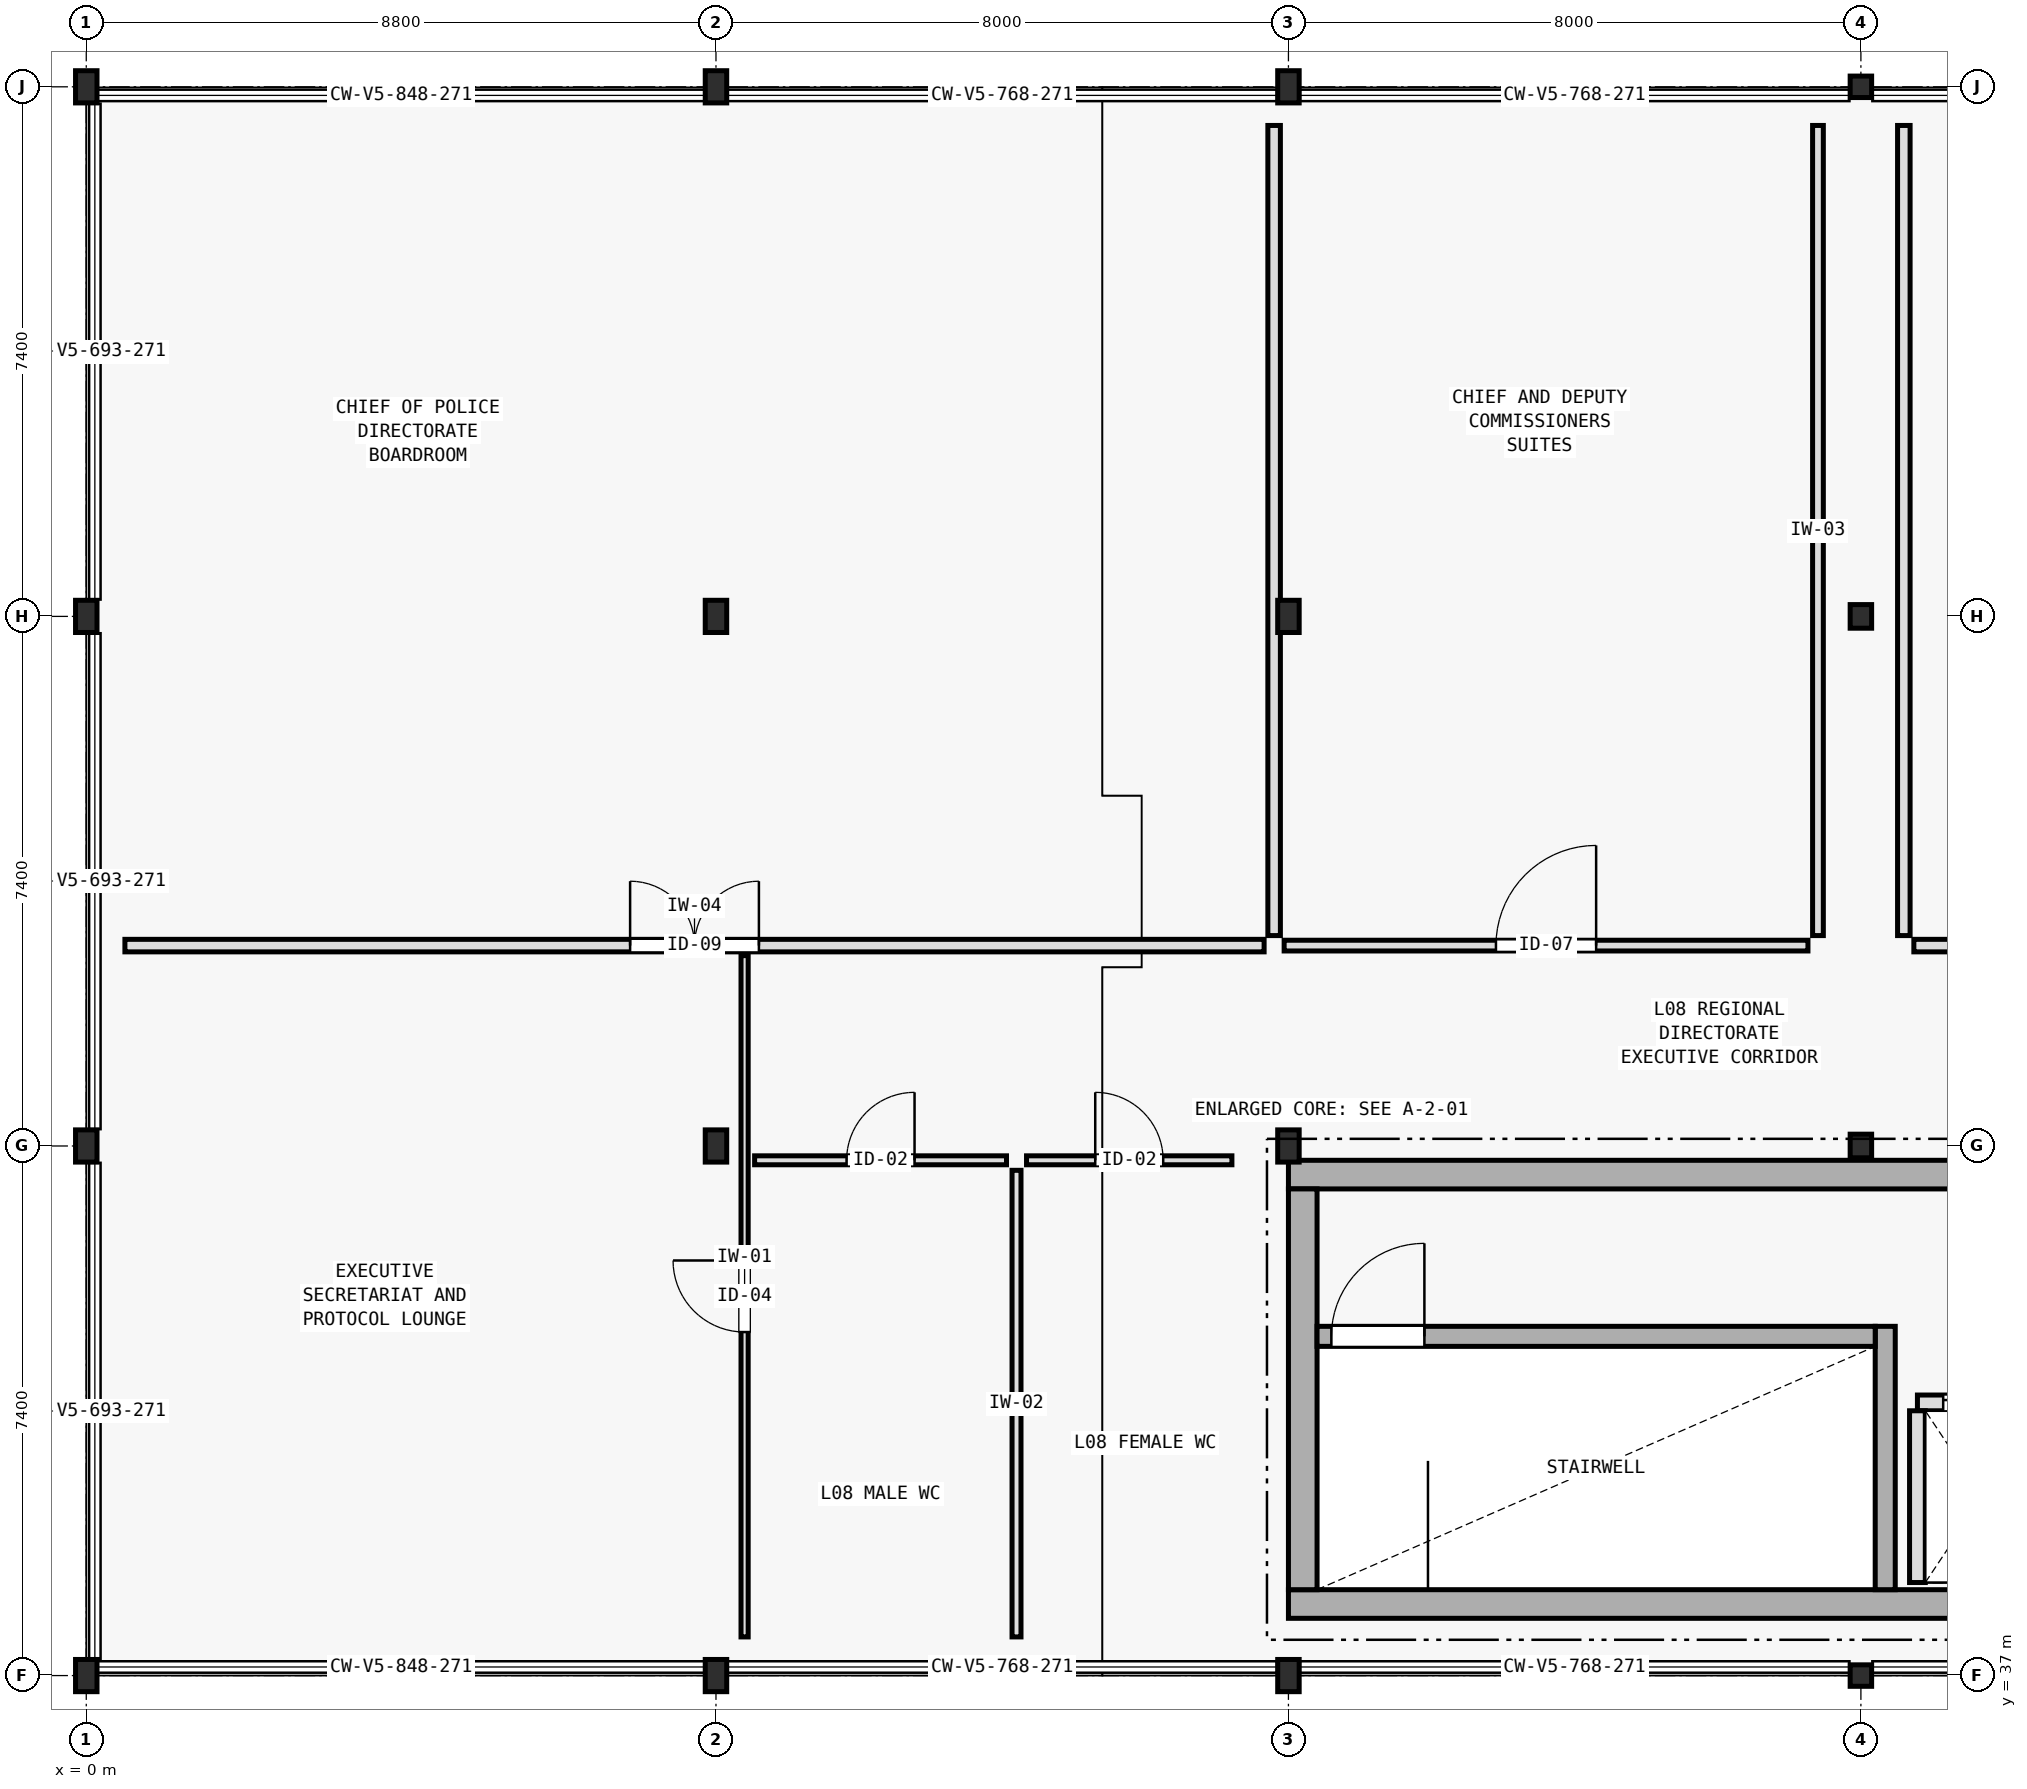
"""IFC4 building model, lengths in metres.
Left out: names, types, materials, properties, quantities, classifications, styles, units other than length and angle.
Written with IfcOpenShell. Run it as: python <this file> out.ifc"""

import sys

from ifc_helpers import new_model, si_unit, direction, frame, frame_2d, origin, origin_2d, place, context, subcontext, project, spatial, rectangle, i_section, extrude, element, fill, save


model = new_model("IFC4")
c1 = context("Model", 3, precision=1e-05, world=origin(), true_north=direction((0.0, 1.0)))
c2 = subcontext(c1, "Body", "Model", "MODEL_VIEW")
j1 = project(units=[si_unit("LENGTHUNIT", "METRE"), si_unit("PLANEANGLEUNIT", "RADIAN")], contexts=[c1])
p1 = place(None, origin())
s1 = spatial("IfcSite", under=j1, at=p1, CompositionType="ELEMENT")
p2 = place(p1, origin())
s2 = spatial("IfcBuilding", under=s1, at=p2, CompositionType="ELEMENT")
p3 = place(p2, frame((0.0, 0.0, 31.1)))
s3 = spatial("IfcBuildingStorey", under=s2, at=p3, CompositionType="ELEMENT", Elevation=31.1)
p4 = place(p3, frame((16.8, 38.0, 0.0), z_axis=(0.0, 0.0, 1.0), x_axis=(1.0, 0.0, 0.0)))
e1 = element("IfcWall", 1, at=p4, inside=s3, PredefinedType="SHEAR", context=c2, shape_type="SweptSolid", body=[
    extrude(rectangle(XDim=16.4, YDim=0.4, at=frame_2d((8.2, 0.0))), origin(), (0.0, 0.0, 1.0), 3.895),
])
p5 = place(p3, frame((16.8, 44.0, 0.0), z_axis=(0.0, 0.0, 1.0), x_axis=(1.0, 0.0, 0.0)))
e2 = element("IfcWall", 2, at=p5, inside=s3, PredefinedType="SHEAR", context=c2, shape_type="SweptSolid", body=[
    extrude(rectangle(XDim=16.4, YDim=0.4, at=frame_2d((8.2, 0.0))), origin(), (0.0, 0.0, 1.0), 3.895),
])
p6 = place(p5, frame((10.3, 0.0, 0.0)))
e3 = element("IfcOpeningElement", 3, at=p6, cuts=e2, PredefinedType="OPENING", context=c2, shape_type="SweptSolid", body=[
    extrude(rectangle(XDim=1.6, YDim=2.2, at=frame_2d((0.8, 1.1))), frame((0.0, 0.21, 0.0), z_axis=(0.0, -1.0, 0.0), x_axis=(1.0, 0.0, 0.0)), (0.0, 0.0, 1.0), 0.42),
])
p7 = place(p3, frame((17.0, 38.2, 0.0), z_axis=(0.0, 0.0, 1.0), x_axis=(0.0, 1.0, 0.0)))
e4 = element("IfcWall", 4, at=p7, inside=s3, PredefinedType="SHEAR", context=c2, shape_type="SweptSolid", body=[
    extrude(rectangle(XDim=5.6, YDim=0.4, at=frame_2d((2.8, 0.0))), origin(), (0.0, 0.0, 1.0), 3.895),
])
p8 = place(p3, frame((25.14, 38.2, 0.0), z_axis=(0.0, 0.0, 1.0), x_axis=(0.0, 1.0, 0.0)))
e5 = element("IfcWall", 5, at=p8, inside=s3, PredefinedType="SHEAR", context=c2, shape_type="SweptSolid", body=[
    extrude(rectangle(XDim=3.68, YDim=0.28, at=frame_2d((1.84, 0.0))), origin(), (0.0, 0.0, 1.0), 3.895),
])
p9 = place(p3, frame((17.2, 41.74, 0.0), z_axis=(0.0, 0.0, 1.0), x_axis=(1.0, 0.0, 0.0)))
e6 = element("IfcWall", 6, at=p9, inside=s3, PredefinedType="SHEAR", context=c2, shape_type="SweptSolid", body=[
    extrude(rectangle(XDim=7.8, YDim=0.28, at=frame_2d((3.9, 0.0))), origin(), (0.0, 0.0, 1.0), 3.895),
])
p10 = place(p9, frame((0.2, 0.0, 0.0)))
e7 = element("IfcOpeningElement", 7, at=p10, cuts=e6, PredefinedType="OPENING", context=c2, shape_type="SweptSolid", body=[
    extrude(rectangle(XDim=1.3, YDim=2.2, at=frame_2d((0.65, 1.1))), frame((0.0, 0.15, 0.0), z_axis=(0.0, -1.0, 0.0), x_axis=(1.0, 0.0, 0.0)), (0.0, 0.0, 1.0), 0.3),
])
for number, where, z_axis, x_axis in (
    (8, (0.0, 37.0, 0.0), (0.0, 0.0, 1.0), (1.0, 0.0, 0.0)),
    (9, (0.0, 44.4, 0.0), (0.0, 0.0, 1.0), (1.0, 0.0, 0.0)),
    (10, (0.0, 51.8, 0.0), (0.0, 0.0, 1.0), (1.0, 0.0, 0.0)),
    (11, (0.0, 59.2, 0.0), (0.0, 0.0, 1.0), (1.0, 0.0, 0.0)),
    (12, (8.8, 37.0, 0.0), (0.0, 0.0, 1.0), (1.0, 0.0, 0.0)),
    (13, (8.8, 44.4, 0.0), (0.0, 0.0, 1.0), (1.0, 0.0, 0.0)),
    (14, (8.8, 51.8, 0.0), (0.0, 0.0, 1.0), (1.0, 0.0, 0.0)),
    (15, (8.8, 59.2, 0.0), (0.0, 0.0, 1.0), (1.0, 0.0, 0.0)),
    (16, (16.8, 37.0, 0.0), (0.0, 0.0, 1.0), (1.0, 0.0, 0.0)),
    (17, (16.8, 44.4, 0.0), (0.0, 0.0, 1.0), (1.0, 0.0, 0.0)),
    (18, (16.8, 51.8, 0.0), (0.0, 0.0, 1.0), (1.0, 0.0, 0.0)),
    (19, (16.8, 59.2, 0.0), (0.0, 0.0, 1.0), (1.0, 0.0, 0.0)),
):
    element("IfcColumn", number, at=place(p3, frame(where, z_axis=z_axis, x_axis=x_axis)), inside=s3, PredefinedType="COLUMN", context=c2, shape_type="SweptSolid", body=[
        extrude(i_section(OverallWidth=0.3, OverallDepth=0.45, WebThickness=0.014, FlangeThickness=0.026, FilletRadius=0.027, at=origin_2d()), origin(), (0.0, 0.0, 1.0), 3.9),
    ])
p11 = place(p3, frame((24.8, 37.0, 0.0), z_axis=(0.0, 0.0, 1.0), x_axis=(1.0, 0.0, 0.0)))
e20 = element("IfcColumn", 20, at=p11, inside=s3, PredefinedType="COLUMN", context=c2, shape_type="SweptSolid", body=[
    extrude(i_section(OverallWidth=0.3, OverallDepth=0.3, WebThickness=0.011, FlangeThickness=0.019, FilletRadius=0.027, at=origin_2d()), origin(), (0.0, 0.0, 1.0), 3.9),
])
for number, where, z_axis, x_axis in (
    (21, (24.8, 44.4, 0.0), (0.0, 0.0, 1.0), (1.0, 0.0, 0.0)),
    (22, (24.8, 51.8, 0.0), (0.0, 0.0, 1.0), (1.0, 0.0, 0.0)),
):
    element("IfcColumn", number, at=place(p3, frame(where, z_axis=z_axis, x_axis=x_axis)), inside=s3, PredefinedType="COLUMN", context=c2, shape_type="SweptSolid", body=[
        extrude(i_section(OverallWidth=0.3, OverallDepth=0.33, WebThickness=0.01, FlangeThickness=0.017, FilletRadius=0.027, at=origin_2d()), origin(), (0.0, 0.0, 1.0), 3.9),
    ])
p12 = place(p3, frame((24.8, 59.2, 0.0), z_axis=(0.0, 0.0, 1.0), x_axis=(1.0, 0.0, 0.0)))
e23 = element("IfcColumn", 23, at=p12, inside=s3, PredefinedType="COLUMN", context=c2, shape_type="SweptSolid", body=[
    extrude(i_section(OverallWidth=0.3, OverallDepth=0.3, WebThickness=0.011, FlangeThickness=0.019, FilletRadius=0.027, at=origin_2d()), origin(), (0.0, 0.0, 1.0), 3.9),
])
p13 = place(p3, frame((25.59, 40.81, 0.0), z_axis=(0.0, 0.0, 1.0), x_axis=(1.0, 0.0, 0.0)))
e24 = element("IfcWall", 24, at=p13, inside=s3, PredefinedType="PLUMBINGWALL", context=c2, shape_type="SweptSolid", body=[
    extrude(rectangle(XDim=1.82, YDim=0.22, at=frame_2d((0.91, 0.0))), origin(), (0.0, 0.0, 1.0), 3.62),
])
p14 = place(p13, frame((0.36, 0.0, 0.0)))
e25 = element("IfcOpeningElement", 25, at=p14, cuts=e24, PredefinedType="OPENING", context=c2, shape_type="SweptSolid", body=[
    extrude(rectangle(XDim=1.1, YDim=2.2, at=frame_2d((0.55, 1.1))), frame((0.0, 0.12, 0.0), z_axis=(0.0, -1.0, 0.0), x_axis=(1.0, 0.0, 0.0)), (0.0, 0.0, 1.0), 0.24),
])
p15 = place(p3, frame((25.59, 38.3, 0.0), z_axis=(0.0, 0.0, 1.0), x_axis=(0.0, 1.0, 0.0)))
e26 = element("IfcWall", 26, at=p15, inside=s3, PredefinedType="PLUMBINGWALL", context=c2, shape_type="SweptSolid", body=[
    extrude(rectangle(XDim=2.4, YDim=0.22, at=frame_2d((1.2, 0.0))), origin(), (0.0, 0.0, 1.0), 3.62),
])
p16 = place(p3, frame((0.54, 47.2, 0.0), z_axis=(0.0, 0.0, 1.0), x_axis=(1.0, 0.0, 0.0)))
e27 = element("IfcWall", 27, at=p16, inside=s3, PredefinedType="PARTITIONING", context=c2, shape_type="SweptSolid", body=[
    extrude(rectangle(XDim=15.92, YDim=0.175, at=frame_2d((7.96, 0.0))), origin(), (0.0, 0.0, 1.0), 3.2),
])
p17 = place(p16, frame((7.06, 0.0, 0.0)))
e28 = element("IfcOpeningElement", 28, at=p17, cuts=e27, PredefinedType="OPENING", context=c2, shape_type="SweptSolid", body=[
    extrude(rectangle(XDim=1.8, YDim=2.3, at=frame_2d((0.9, 1.15))), frame((0.0, 0.098, 0.0), z_axis=(0.0, -1.0, 0.0), x_axis=(1.0, 0.0, 0.0)), (0.0, 0.0, 1.0), 0.195),
])
p18 = place(p3, frame((16.6, 47.34, 0.0), z_axis=(0.0, 0.0, 1.0), x_axis=(0.0, 1.0, 0.0)))
e29 = element("IfcWall", 29, at=p18, inside=s3, PredefinedType="PARTITIONING", context=c2, shape_type="SweptSolid", body=[
    extrude(rectangle(XDim=11.32, YDim=0.175, at=frame_2d((5.66, 0.0))), origin(), (0.0, 0.0, 1.0), 2.7),
])
p19 = place(p3, frame((16.74, 47.2, 0.0), z_axis=(0.0, 0.0, 1.0), x_axis=(1.0, 0.0, 0.0)))
e30 = element("IfcWall", 30, at=p19, inside=s3, PredefinedType="PARTITIONING", context=c2, shape_type="SweptSolid", body=[
    extrude(rectangle(XDim=7.32, YDim=0.15, at=frame_2d((3.66, 0.0))), origin(), (0.0, 0.0, 1.0), 3.2),
])
p20 = place(p19, frame((2.96, 0.0, 0.0)))
e31 = element("IfcOpeningElement", 31, at=p20, cuts=e30, PredefinedType="OPENING", context=c2, shape_type="SweptSolid", body=[
    extrude(rectangle(XDim=1.4, YDim=2.2, at=frame_2d((0.7, 1.1))), frame((0.0, 0.085, 0.0), z_axis=(0.0, -1.0, 0.0), x_axis=(1.0, 0.0, 0.0)), (0.0, 0.0, 1.0), 0.17),
])
p21 = place(p3, frame((24.2, 47.34, 0.0), z_axis=(0.0, 0.0, 1.0), x_axis=(0.0, 1.0, 0.0)))
e32 = element("IfcWall", 32, at=p21, inside=s3, PredefinedType="PARTITIONING", context=c2, shape_type="SweptSolid", body=[
    extrude(rectangle(XDim=11.32, YDim=0.15, at=frame_2d((5.66, 0.0))), origin(), (0.0, 0.0, 1.0), 2.7),
])
p22 = place(p3, frame((25.54, 47.2, 0.0), z_axis=(0.0, 0.0, 1.0), x_axis=(1.0, 0.0, 0.0)))
e33 = element("IfcWall", 33, at=p22, inside=s3, PredefinedType="PARTITIONING", context=c2, shape_type="SweptSolid", body=[
    extrude(rectangle(XDim=12.32, YDim=0.175, at=frame_2d((6.16, 0.0))), origin(), (0.0, 0.0, 1.0), 3.2),
])
p23 = place(p22, frame((5.46, 0.0, 0.0)))
e34 = element("IfcOpeningElement", 34, at=p23, cuts=e33, PredefinedType="OPENING", context=c2, shape_type="SweptSolid", body=[
    extrude(rectangle(XDim=1.4, YDim=2.2, at=frame_2d((0.7, 1.1))), frame((0.0, 0.098, 0.0), z_axis=(0.0, -1.0, 0.0), x_axis=(1.0, 0.0, 0.0)), (0.0, 0.0, 1.0), 0.195),
])
p24 = place(p3, frame((25.4, 47.34, 0.0), z_axis=(0.0, 0.0, 1.0), x_axis=(0.0, 1.0, 0.0)))
e35 = element("IfcWall", 35, at=p24, inside=s3, PredefinedType="PARTITIONING", context=c2, shape_type="SweptSolid", body=[
    extrude(rectangle(XDim=11.32, YDim=0.175, at=frame_2d((5.66, 0.0))), origin(), (0.0, 0.0, 1.0), 3.2),
])
p25 = place(p3, frame((9.2, 37.54, 0.0), z_axis=(0.0, 0.0, 1.0), x_axis=(0.0, 1.0, 0.0)))
e36 = element("IfcWall", 36, at=p25, inside=s3, PredefinedType="PARTITIONING", context=c2, shape_type="SweptSolid", body=[
    extrude(rectangle(XDim=9.52, YDim=0.1, at=frame_2d((4.76, 0.0))), origin(), (0.0, 0.0, 1.0), 2.7),
])
p26 = place(p25, frame((4.26, 0.0, 0.0)))
e37 = element("IfcOpeningElement", 37, at=p26, cuts=e36, PredefinedType="OPENING", context=c2, shape_type="SweptSolid", body=[
    extrude(rectangle(XDim=1.0, YDim=2.2, at=frame_2d((0.5, 1.1))), frame((0.0, 0.06, 0.0), z_axis=(0.0, -1.0, 0.0), x_axis=(1.0, 0.0, 0.0)), (0.0, 0.0, 1.0), 0.12),
])
p27 = place(p3, frame((9.34, 44.2, 0.0), z_axis=(0.0, 0.0, 1.0), x_axis=(1.0, 0.0, 0.0)))
e38 = element("IfcWall", 38, at=p27, inside=s3, PredefinedType="PARTITIONING", context=c2, shape_type="SweptSolid", body=[
    extrude(rectangle(XDim=3.52, YDim=0.125, at=frame_2d((1.76, 0.0))), origin(), (0.0, 0.0, 1.0), 2.7),
])
p28 = place(p27, frame((1.285, 0.0, 0.0)))
e39 = element("IfcOpeningElement", 39, at=p28, cuts=e38, PredefinedType="OPENING", context=c2, shape_type="SweptSolid", body=[
    extrude(rectangle(XDim=0.95, YDim=2.1, at=frame_2d((0.475, 1.05))), frame((0.0, 0.073, 0.0), z_axis=(0.0, -1.0, 0.0), x_axis=(1.0, 0.0, 0.0)), (0.0, 0.0, 1.0), 0.145),
])
p29 = place(p3, frame((13.0, 37.54, 0.0), z_axis=(0.0, 0.0, 1.0), x_axis=(0.0, 1.0, 0.0)))
e40 = element("IfcWall", 40, at=p29, inside=s3, PredefinedType="PARTITIONING", context=c2, shape_type="SweptSolid", body=[
    extrude(rectangle(XDim=6.52, YDim=0.125, at=frame_2d((3.26, 0.0))), origin(), (0.0, 0.0, 1.0), 3.62),
])
p30 = place(p3, frame((13.14, 44.2, 0.0), z_axis=(0.0, 0.0, 1.0), x_axis=(1.0, 0.0, 0.0)))
e41 = element("IfcWall", 41, at=p30, inside=s3, PredefinedType="PARTITIONING", context=c2, shape_type="SweptSolid", body=[
    extrude(rectangle(XDim=2.87, YDim=0.125, at=frame_2d((1.435, 0.0))), origin(), (0.0, 0.0, 1.0), 2.7),
])
p31 = place(p30, frame((0.96, 0.0, 0.0)))
e42 = element("IfcOpeningElement", 42, at=p31, cuts=e41, PredefinedType="OPENING", context=c2, shape_type="SweptSolid", body=[
    extrude(rectangle(XDim=0.95, YDim=2.1, at=frame_2d((0.475, 1.05))), frame((0.0, 0.073, 0.0), z_axis=(0.0, -1.0, 0.0), x_axis=(1.0, 0.0, 0.0)), (0.0, 0.0, 1.0), 0.145),
])
p32 = place(p2, frame((0.0, 0.0, 35.0)))
p33 = place(p32, frame((0.0, 0.0, -0.28)))
p34 = place(p33, frame((21.0, 40.0, 0.23)))
e43 = element("IfcWindow", 43, at=p34, inside=s3, PartitioningType="SINGLE_PANEL", PredefinedType="SKYLIGHT", context=c2, shape_type="SweptSolid", body=[
    extrude(rectangle(XDim=1.1, YDim=1.4, at=origin_2d()), origin(), (0.0, 0.0, 1.0), 0.05),
])
p35 = place(p10, origin())
e44 = element("IfcDoor", 44, at=p35, inside=s3, OperationType="SINGLE_SWING_RIGHT", PredefinedType="DOOR", context=c2, shape_type="SweptSolid", body=[
    extrude(rectangle(XDim=1.3, YDim=2.2, at=frame_2d((0.65, 1.1))), frame((0.0, 0.025, 0.0), z_axis=(0.0, -1.0, 0.0), x_axis=(1.0, 0.0, 0.0)), (0.0, 0.0, 1.0), 0.05),
])
fill(e7, e44)
p36 = place(p14, origin())
e45 = element("IfcDoor", 45, at=p36, inside=s3, OperationType="DOUBLE_DOOR_SLIDING", PredefinedType="DOOR", context=c2, shape_type="SweptSolid", body=[
    extrude(rectangle(XDim=1.1, YDim=2.2, at=frame_2d((0.55, 1.1))), frame((0.0, 0.025, 0.0), z_axis=(0.0, -1.0, 0.0), x_axis=(1.0, 0.0, 0.0)), (0.0, 0.0, 1.0), 0.05),
])
fill(e25, e45)
p37 = place(p17, origin())
e46 = element("IfcDoor", 46, at=p37, inside=s3, OperationType="DOUBLE_DOOR_SINGLE_SWING", PredefinedType="DOOR", context=c2, shape_type="SweptSolid", body=[
    extrude(rectangle(XDim=1.8, YDim=2.3, at=frame_2d((0.9, 1.15))), frame((0.0, 0.025, 0.0), z_axis=(0.0, -1.0, 0.0), x_axis=(1.0, 0.0, 0.0)), (0.0, 0.0, 1.0), 0.05),
])
fill(e28, e46)
p38 = place(p20, origin())
e47 = element("IfcDoor", 47, at=p38, inside=s3, OperationType="SINGLE_SWING_RIGHT", PredefinedType="DOOR", context=c2, shape_type="SweptSolid", body=[
    extrude(rectangle(XDim=1.4, YDim=2.2, at=frame_2d((0.7, 1.1))), frame((0.0, 0.025, 0.0), z_axis=(0.0, -1.0, 0.0), x_axis=(1.0, 0.0, 0.0)), (0.0, 0.0, 1.0), 0.05),
])
fill(e31, e47)
p39 = place(p26, origin())
e48 = element("IfcDoor", 48, at=p39, inside=s3, OperationType="SINGLE_SWING_RIGHT", PredefinedType="DOOR", context=c2, shape_type="SweptSolid", body=[
    extrude(rectangle(XDim=1.0, YDim=2.2, at=frame_2d((0.5, 1.1))), frame((0.0, 0.025, 0.0), z_axis=(0.0, -1.0, 0.0), x_axis=(1.0, 0.0, 0.0)), (0.0, 0.0, 1.0), 0.05),
])
fill(e37, e48)
p40 = place(p28, origin())
e49 = element("IfcDoor", 49, at=p40, inside=s3, OperationType="SINGLE_SWING_RIGHT", PredefinedType="DOOR", context=c2, shape_type="SweptSolid", body=[
    extrude(rectangle(XDim=0.95, YDim=2.1, at=frame_2d((0.475, 1.05))), frame((0.0, 0.025, 0.0), z_axis=(0.0, -1.0, 0.0), x_axis=(1.0, 0.0, 0.0)), (0.0, 0.0, 1.0), 0.05),
])
fill(e39, e49)
p41 = place(p31, origin())
e50 = element("IfcDoor", 50, at=p41, inside=s3, OperationType="SINGLE_SWING_LEFT", PredefinedType="DOOR", context=c2, shape_type="SweptSolid", body=[
    extrude(rectangle(XDim=0.95, YDim=2.1, at=frame_2d((0.475, 1.05))), frame((0.0, 0.025, 0.0), z_axis=(0.0, -1.0, 0.0), x_axis=(1.0, 0.0, 0.0)), (0.0, 0.0, 1.0), 0.05),
])
fill(e42, e50)
save(model, sys.argv[1])
